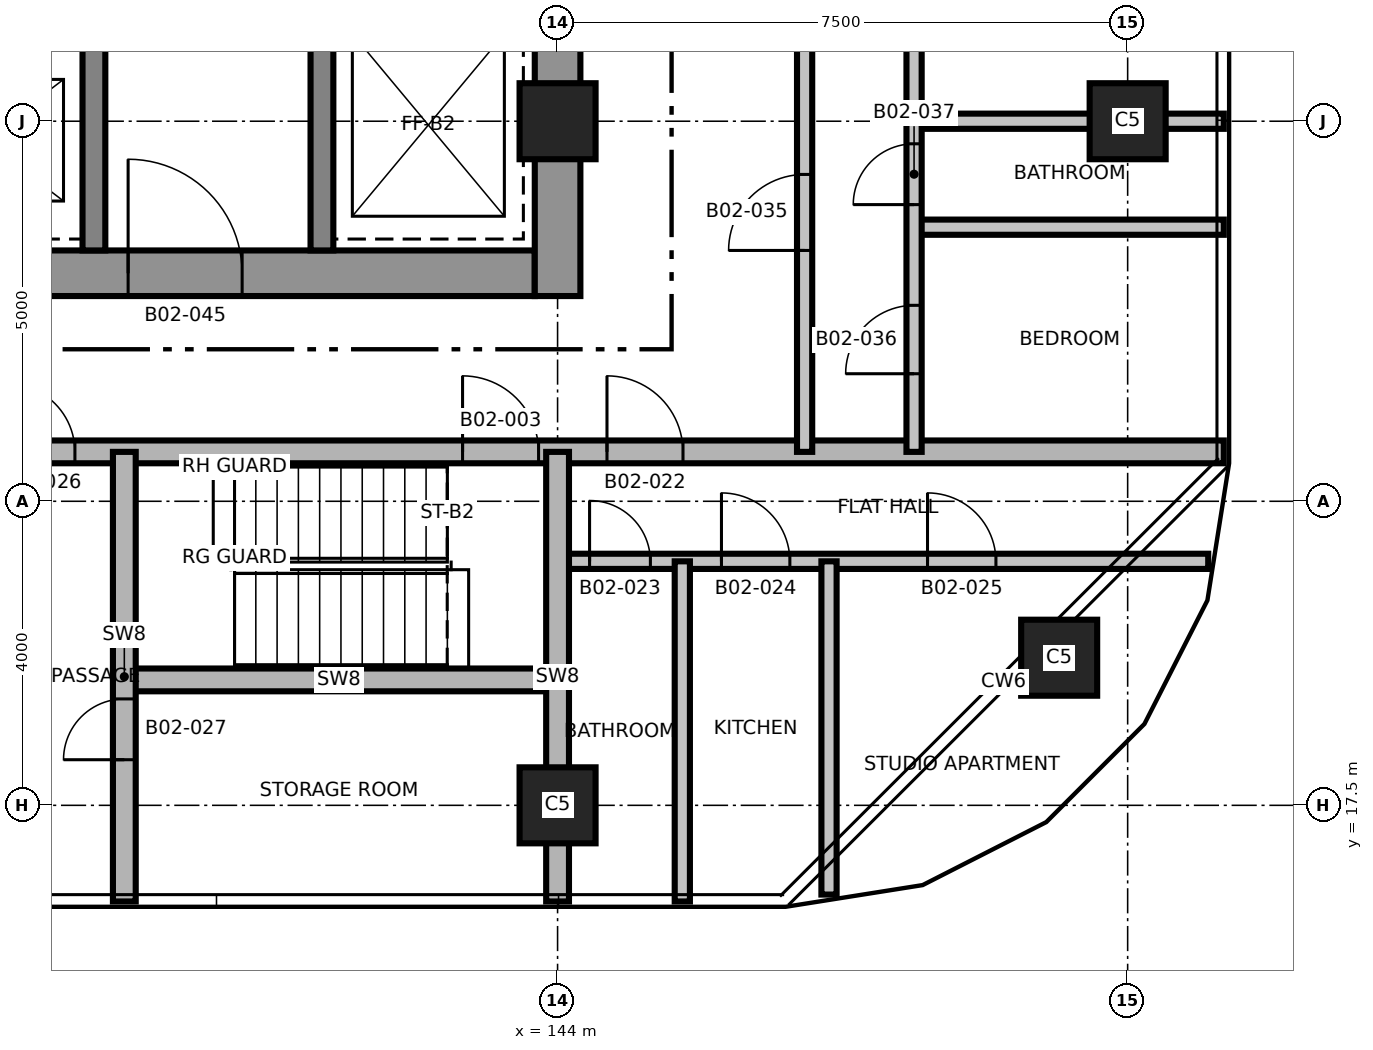
"""IFC4 building model, lengths in metres.
Left out: names, types, materials, properties, quantities, classifications, styles, units other than length and angle.
Written with IfcOpenShell. Run it as: python <this file> out.ifc"""

import sys

from ifc_helpers import new_model, si_unit, direction, frame, frame_2d, origin, origin_2d, place, context, subcontext, project, spatial, rectangle, extrude, element, fill, save


model = new_model("IFC4")
c1 = context("Model", 3, precision=1e-05, world=origin(), true_north=direction((0.0, 1.0)))
c2 = subcontext(c1, "Body", "Model", "MODEL_VIEW")
j1 = project(units=[si_unit("LENGTHUNIT", "METRE"), si_unit("PLANEANGLEUNIT", "RADIAN")], contexts=[c1])
p1 = place(None, origin())
s1 = spatial("IfcSite", under=j1, at=p1, CompositionType="ELEMENT")
p2 = place(p1, origin())
s2 = spatial("IfcBuilding", under=s1, at=p2, CompositionType="ELEMENT")
p3 = place(p2, frame((0.0, 0.0, 48.3)))
s3 = spatial("IfcBuildingStorey", under=s2, at=p3, CompositionType="ELEMENT", Elevation=48.3)
p4 = place(p3, frame((128.7, 24.5, 0.0), z_axis=(0.0, 0.0, 1.0), x_axis=(1.0, 0.0, 0.0)))
e1 = element("IfcWall", 1, at=p4, inside=s3, PredefinedType="SHEAR", context=c2, shape_type="SweptSolid", body=[
    extrude(rectangle(XDim=15.0, YDim=0.6, at=frame_2d((7.5, 0.0))), origin(), (0.0, 0.0, 1.0), 3.7),
])
p5 = place(p4, frame((9.65, 0.0, 0.0)))
e2 = element("IfcOpeningElement", 2, at=p5, cuts=e1, PredefinedType="OPENING", context=c2, shape_type="SweptSolid", body=[
    extrude(rectangle(XDim=1.5, YDim=2.1, at=frame_2d((0.75, 1.05))), frame((0.0, 0.31, 0.0), z_axis=(0.0, -1.0, 0.0), x_axis=(1.0, 0.0, 0.0)), (0.0, 0.0, 1.0), 0.62),
])
p6 = place(p4, frame((1.25, 0.0, 0.0)))
e3 = element("IfcOpeningElement", 3, at=p6, cuts=e1, PredefinedType="OPENING", context=c2, shape_type="SweptSolid", body=[
    extrude(rectangle(XDim=0.9, YDim=2.1, at=frame_2d((0.45, 1.05))), frame((0.0, 0.31, 0.0), z_axis=(0.0, -1.0, 0.0), x_axis=(1.0, 0.0, 0.0)), (0.0, 0.0, 1.0), 0.62),
])
p7 = place(p3, frame((144.0, 24.2, 0.0), z_axis=(0.0, 0.0, 1.0), x_axis=(0.0, 1.0, 0.0)))
e4 = element("IfcWall", 4, at=p7, inside=s3, PredefinedType="SHEAR", context=c2, shape_type="SweptSolid", body=[
    extrude(rectangle(XDim=13.6, YDim=0.6, at=frame_2d((6.8, 0.0))), origin(), (0.0, 0.0, 1.0), 3.7),
])
p8 = place(p3, frame((137.9, 24.8, 0.0), z_axis=(0.0, 0.0, 1.0), x_axis=(0.0, 1.0, 0.0)))
e5 = element("IfcWall", 5, at=p8, inside=s3, PredefinedType="SHEAR", context=c2, shape_type="SweptSolid", body=[
    extrude(rectangle(XDim=12.4, YDim=0.3, at=frame_2d((6.2, 0.0))), origin(), (0.0, 0.0, 1.0), 3.7),
])
p9 = place(p8, frame((3.95, 0.0, 0.0)))
e6 = element("IfcOpeningElement", 6, at=p9, cuts=e5, PredefinedType="OPENING", context=c2, shape_type="SweptSolid", body=[
    extrude(rectangle(XDim=1.5, YDim=2.1, at=frame_2d((0.75, 1.05))), frame((0.0, 0.16, 0.0), z_axis=(0.0, -1.0, 0.0), x_axis=(1.0, 0.0, 0.0)), (0.0, 0.0, 1.0), 0.32),
])
p10 = place(p8, frame((10.45, 0.0, 0.0)))
e7 = element("IfcOpeningElement", 7, at=p10, cuts=e5, PredefinedType="OPENING", context=c2, shape_type="SweptSolid", body=[
    extrude(rectangle(XDim=0.9, YDim=2.1, at=frame_2d((0.45, 1.05))), frame((0.0, 0.16, 0.0), z_axis=(0.0, -1.0, 0.0), x_axis=(1.0, 0.0, 0.0)), (0.0, 0.0, 1.0), 0.32),
])
p11 = place(p3, frame((140.9, 24.8, 0.0), z_axis=(0.0, 0.0, 1.0), x_axis=(0.0, 1.0, 0.0)))
e8 = element("IfcWall", 8, at=p11, inside=s3, PredefinedType="SHEAR", context=c2, shape_type="SweptSolid", body=[
    extrude(rectangle(XDim=12.4, YDim=0.3, at=frame_2d((6.2, 0.0))), origin(), (0.0, 0.0, 1.0), 3.7),
])
p12 = place(p11, frame((5.9, 0.0, 0.0)))
e9 = element("IfcOpeningElement", 9, at=p12, cuts=e8, PredefinedType="OPENING", context=c2, shape_type="SweptSolid", body=[
    extrude(rectangle(XDim=1.2, YDim=2.1, at=frame_2d((0.6, 1.05))), frame((0.0, 0.16, 0.0), z_axis=(0.0, -1.0, 0.0), x_axis=(1.0, 0.0, 0.0)), (0.0, 0.0, 1.0), 0.32),
])
for number, where, z_axis, x_axis in (
    (10, (144.0, 17.5, 0.0), (0.0, 0.0, 1.0), (1.0, 0.0, 0.0)),
    (11, (150.599, 19.442, 0.0), (0.0, 0.0, 1.0), (1.0, 0.0, 0.0)),
    (12, (144.0, 26.5, 0.0), (0.0, 0.0, 1.0), (1.0, 0.0, 0.0)),
    (13, (151.5, 26.5, 0.0), (0.0, 0.0, 1.0), (1.0, 0.0, 0.0)),
):
    element("IfcColumn", number, at=place(p3, frame(where, z_axis=z_axis, x_axis=x_axis)), inside=s3, PredefinedType="COLUMN", context=c2, shape_type="SweptSolid", body=[
        extrude(rectangle(XDim=1.0, YDim=1.0, at=origin_2d()), origin(), (0.0, 0.0, 1.0), 3.7),
    ])
p13 = place(p3, frame((138.25, 19.15, 0.0), z_axis=(0.0, 0.0, 1.0), x_axis=(1.0, 0.0, 0.0)))
e14 = element("IfcWall", 14, at=p13, inside=s3, PredefinedType="SHEAR", context=c2, shape_type="SweptSolid", body=[
    extrude(rectangle(XDim=5.75, YDim=0.3, at=frame_2d((2.875, 0.0))), origin(), (0.0, 0.0, 1.0), 3.4),
])
p14 = place(p3, frame((144.0, 20.71, 0.0), z_axis=(0.0, 0.0, 1.0), x_axis=(1.0, 0.0, 0.0)))
e15 = element("IfcWall", 15, at=p14, inside=s3, PredefinedType="PARTITIONING", context=c2, shape_type="SweptSolid", body=[
    extrude(rectangle(XDim=8.56, YDim=0.2, at=frame_2d((4.28, 0.0))), origin(), (0.0, 0.0, 1.0), 3.4),
])
p15 = place(p14, frame((0.421, 0.0, 0.0)))
e16 = element("IfcOpeningElement", 16, at=p15, cuts=e15, PredefinedType="OPENING", context=c2, shape_type="SweptSolid", body=[
    extrude(rectangle(XDim=0.8, YDim=2.1, at=frame_2d((0.4, 1.05))), frame((0.0, 0.11, 0.0), z_axis=(0.0, -1.0, 0.0), x_axis=(1.0, 0.0, 0.0)), (0.0, 0.0, 1.0), 0.22),
])
p16 = place(p14, frame((2.156, 0.0, 0.0)))
e17 = element("IfcOpeningElement", 17, at=p16, cuts=e15, PredefinedType="OPENING", context=c2, shape_type="SweptSolid", body=[
    extrude(rectangle(XDim=0.9, YDim=2.1, at=frame_2d((0.45, 1.05))), frame((0.0, 0.11, 0.0), z_axis=(0.0, -1.0, 0.0), x_axis=(1.0, 0.0, 0.0)), (0.0, 0.0, 1.0), 0.22),
])
p17 = place(p14, frame((4.867, 0.0, 0.0)))
e18 = element("IfcOpeningElement", 18, at=p17, cuts=e15, PredefinedType="OPENING", context=c2, shape_type="SweptSolid", body=[
    extrude(rectangle(XDim=0.9, YDim=2.1, at=frame_2d((0.45, 1.05))), frame((0.0, 0.11, 0.0), z_axis=(0.0, -1.0, 0.0), x_axis=(1.0, 0.0, 0.0)), (0.0, 0.0, 1.0), 0.22),
])
p18 = place(p3, frame((120.235, 22.15, 0.0), z_axis=(0.0, 0.0, 1.0), x_axis=(1.0, 0.0, 0.0)))
e19 = element("IfcWall", 19, at=p18, inside=s3, PredefinedType="SHEAR", context=c2, shape_type="SweptSolid", body=[
    extrude(rectangle(XDim=32.53, YDim=0.3, at=frame_2d((16.265, 0.0))), origin(), (0.0, 0.0, 1.0), 3.4),
])
p19 = place(p18, frame((22.515, 0.0, 0.0)))
e20 = element("IfcOpeningElement", 20, at=p19, cuts=e19, PredefinedType="OPENING", context=c2, shape_type="SweptSolid", body=[
    extrude(rectangle(XDim=1.0, YDim=2.1, at=frame_2d((0.5, 1.05))), frame((0.0, 0.16, 0.0), z_axis=(0.0, -1.0, 0.0), x_axis=(1.0, 0.0, 0.0)), (0.0, 0.0, 1.0), 0.32),
])
p20 = place(p18, frame((10.865, 0.0, 0.0)))
e21 = element("IfcOpeningElement", 21, at=p20, cuts=e19, PredefinedType="OPENING", context=c2, shape_type="SweptSolid", body=[
    extrude(rectangle(XDim=1.0, YDim=2.1, at=frame_2d((0.5, 1.05))), frame((0.0, 0.16, 0.0), z_axis=(0.0, -1.0, 0.0), x_axis=(1.0, 0.0, 0.0)), (0.0, 0.0, 1.0), 0.32),
])
p21 = place(p18, frame((24.415, 0.0, 0.0)))
e22 = element("IfcOpeningElement", 22, at=p21, cuts=e19, PredefinedType="OPENING", context=c2, shape_type="SweptSolid", body=[
    extrude(rectangle(XDim=1.0, YDim=2.1, at=frame_2d((0.5, 1.05))), frame((0.0, 0.16, 0.0), z_axis=(0.0, -1.0, 0.0), x_axis=(1.0, 0.0, 0.0)), (0.0, 0.0, 1.0), 0.32),
])
p22 = place(p18, frame((16.515, 0.0, 0.0)))
e23 = element("IfcOpeningElement", 23, at=p22, cuts=e19, PredefinedType="OPENING", context=c2, shape_type="SweptSolid", body=[
    extrude(rectangle(XDim=0.9, YDim=2.1, at=frame_2d((0.45, 1.05))), frame((0.0, 0.16, 0.0), z_axis=(0.0, -1.0, 0.0), x_axis=(1.0, 0.0, 0.0)), (0.0, 0.0, 1.0), 0.32),
])
for number, where, z_axis, x_axis in (
    (24, (148.69, 25.106, 0.0), (0.0, 0.0, 1.0), (1.0, 0.0, 0.0)),
    (25, (148.69, 26.5, 0.0), (0.0, 0.0, 1.0), (1.0, 0.0, 0.0)),
):
    element("IfcWall", number, at=place(p3, frame(where, z_axis=z_axis, x_axis=x_axis)), inside=s3, PredefinedType="PARTITIONING", context=c2, shape_type="SweptSolid", body=[
        extrude(rectangle(XDim=4.075, YDim=0.2, at=frame_2d((2.038, 0.0))), origin(), (0.0, 0.0, 1.0), 3.4),
    ])
p23 = place(p3, frame((138.3, 16.235, 0.0), z_axis=(0.0, 0.0, 1.0), x_axis=(0.0, 1.0, 0.0)))
e26 = element("IfcWall", 26, at=p23, inside=s3, PredefinedType="SHEAR", context=c2, shape_type="SweptSolid", body=[
    extrude(rectangle(XDim=5.915, YDim=0.3, at=frame_2d((2.958, 0.0))), origin(), (0.0, 0.0, 1.0), 3.4),
])
p24 = place(p23, frame((1.865, 0.0, 0.0)))
e27 = element("IfcOpeningElement", 27, at=p24, cuts=e26, PredefinedType="OPENING", context=c2, shape_type="SweptSolid", body=[
    extrude(rectangle(XDim=0.8, YDim=2.1, at=frame_2d((0.4, 1.05))), frame((0.0, 0.16, 0.0), z_axis=(0.0, -1.0, 0.0), x_axis=(1.0, 0.0, 0.0)), (0.0, 0.0, 1.0), 0.32),
])
p25 = place(p3, frame((144.0, 16.235, 0.0), z_axis=(0.0, 0.0, 1.0), x_axis=(0.0, 1.0, 0.0)))
e28 = element("IfcWall", 28, at=p25, inside=s3, PredefinedType="SHEAR", context=c2, shape_type="SweptSolid", body=[
    extrude(rectangle(XDim=5.915, YDim=0.3, at=frame_2d((2.958, 0.0))), origin(), (0.0, 0.0, 1.0), 3.4),
])
p26 = place(p3, frame((145.641, 16.235, 0.0), z_axis=(0.0, 0.0, 1.0), x_axis=(0.0, 1.0, 0.0)))
e29 = element("IfcWall", 29, at=p26, inside=s3, PredefinedType="PARTITIONING", context=c2, shape_type="SweptSolid", body=[
    extrude(rectangle(XDim=4.475, YDim=0.2, at=frame_2d((2.237, 0.0))), origin(), (0.0, 0.0, 1.0), 3.4),
])
p27 = place(p3, frame((147.25, 22.15, 0.0), z_axis=(0.0, 0.0, 1.0), x_axis=(0.0, 1.0, 0.0)))
e30 = element("IfcWall", 30, at=p27, inside=s3, PredefinedType="PARTITIONING", context=c2, shape_type="SweptSolid", body=[
    extrude(rectangle(XDim=17.7, YDim=0.2, at=frame_2d((8.85, 0.0))), origin(), (0.0, 0.0, 1.0), 3.4),
])
p28 = place(p27, frame((2.65, 0.0, 0.0)))
e31 = element("IfcOpeningElement", 31, at=p28, cuts=e30, PredefinedType="OPENING", context=c2, shape_type="SweptSolid", body=[
    extrude(rectangle(XDim=1.0, YDim=2.1, at=frame_2d((0.5, 1.05))), frame((0.0, 0.11, 0.0), z_axis=(0.0, -1.0, 0.0), x_axis=(1.0, 0.0, 0.0)), (0.0, 0.0, 1.0), 0.22),
])
p29 = place(p3, frame((147.571, 16.326, 0.0), z_axis=(0.0, 0.0, 1.0), x_axis=(0.0, 1.0, 0.0)))
e32 = element("IfcWall", 32, at=p29, inside=s3, PredefinedType="PARTITIONING", context=c2, shape_type="SweptSolid", body=[
    extrude(rectangle(XDim=4.384, YDim=0.2, at=frame_2d((2.192, 0.0))), origin(), (0.0, 0.0, 1.0), 3.4),
])
p30 = place(p3, frame((148.69, 22.15, 0.0), z_axis=(0.0, 0.0, 1.0), x_axis=(0.0, 1.0, 0.0)))
e33 = element("IfcWall", 33, at=p30, inside=s3, PredefinedType="PARTITIONING", context=c2, shape_type="SweptSolid", body=[
    extrude(rectangle(XDim=17.7, YDim=0.2, at=frame_2d((8.85, 0.0))), origin(), (0.0, 0.0, 1.0), 3.4),
])
p31 = place(p30, frame((1.028, 0.0, 0.0)))
e34 = element("IfcOpeningElement", 34, at=p31, cuts=e33, PredefinedType="OPENING", context=c2, shape_type="SweptSolid", body=[
    extrude(rectangle(XDim=0.9, YDim=2.1, at=frame_2d((0.45, 1.05))), frame((0.0, 0.11, 0.0), z_axis=(0.0, -1.0, 0.0), x_axis=(1.0, 0.0, 0.0)), (0.0, 0.0, 1.0), 0.22),
])
p32 = place(p30, frame((3.253, 0.0, 0.0)))
e35 = element("IfcOpeningElement", 35, at=p32, cuts=e33, PredefinedType="OPENING", context=c2, shape_type="SweptSolid", body=[
    extrude(rectangle(XDim=0.8, YDim=2.1, at=frame_2d((0.4, 1.05))), frame((0.0, 0.11, 0.0), z_axis=(0.0, -1.0, 0.0), x_axis=(1.0, 0.0, 0.0)), (0.0, 0.0, 1.0), 0.22),
])
p33 = place(p30, frame((6.867, 0.0, 0.0)))
e36 = element("IfcOpeningElement", 36, at=p33, cuts=e33, PredefinedType="OPENING", context=c2, shape_type="SweptSolid", body=[
    extrude(rectangle(XDim=0.9, YDim=2.1, at=frame_2d((0.45, 1.05))), frame((0.0, 0.11, 0.0), z_axis=(0.0, -1.0, 0.0), x_axis=(1.0, 0.0, 0.0)), (0.0, 0.0, 1.0), 0.22),
])
p34 = place(p30, frame((11.367, 0.0, 0.0)))
e37 = element("IfcOpeningElement", 37, at=p34, cuts=e33, PredefinedType="OPENING", context=c2, shape_type="SweptSolid", body=[
    extrude(rectangle(XDim=0.9, YDim=2.1, at=frame_2d((0.45, 1.05))), frame((0.0, 0.11, 0.0), z_axis=(0.0, -1.0, 0.0), x_axis=(1.0, 0.0, 0.0)), (0.0, 0.0, 1.0), 0.22),
])
p35 = place(p30, frame((15.075, 0.0, 0.0)))
e38 = element("IfcOpeningElement", 38, at=p35, cuts=e33, PredefinedType="OPENING", context=c2, shape_type="SweptSolid", body=[
    extrude(rectangle(XDim=0.9, YDim=2.1, at=frame_2d((0.45, 1.05))), frame((0.0, 0.11, 0.0), z_axis=(0.0, -1.0, 0.0), x_axis=(1.0, 0.0, 0.0)), (0.0, 0.0, 1.0), 0.22),
])
p36 = place(p19, origin())
e39 = element("IfcDoor", 39, at=p36, inside=s3, OperationType="SINGLE_SWING_LEFT", PredefinedType="DOOR", context=c2, shape_type="SweptSolid", body=[
    extrude(rectangle(XDim=1.0, YDim=2.1, at=frame_2d((0.5, 1.05))), frame((0.0, 0.025, 0.0), z_axis=(0.0, -1.0, 0.0), x_axis=(1.0, 0.0, 0.0)), (0.0, 0.0, 1.0), 0.05),
])
fill(e20, e39)
p37 = place(p21, origin())
e40 = element("IfcDoor", 40, at=p37, inside=s3, OperationType="SINGLE_SWING_RIGHT", PredefinedType="DOOR", context=c2, shape_type="SweptSolid", body=[
    extrude(rectangle(XDim=1.0, YDim=2.1, at=frame_2d((0.5, 1.05))), frame((0.0, 0.025, 0.0), z_axis=(0.0, -1.0, 0.0), x_axis=(1.0, 0.0, 0.0)), (0.0, 0.0, 1.0), 0.05),
])
fill(e22, e40)
p38 = place(p15, origin())
e41 = element("IfcDoor", 41, at=p38, inside=s3, OperationType="SINGLE_SWING_LEFT", PredefinedType="DOOR", context=c2, shape_type="SweptSolid", body=[
    extrude(rectangle(XDim=0.8, YDim=2.1, at=frame_2d((0.4, 1.05))), frame((0.0, 0.025, 0.0), z_axis=(0.0, -1.0, 0.0), x_axis=(1.0, 0.0, 0.0)), (0.0, 0.0, 1.0), 0.05),
])
fill(e16, e41)
p39 = place(p16, origin())
e42 = element("IfcDoor", 42, at=p39, inside=s3, OperationType="SINGLE_SWING_RIGHT", PredefinedType="DOOR", context=c2, shape_type="SweptSolid", body=[
    extrude(rectangle(XDim=0.9, YDim=2.1, at=frame_2d((0.45, 1.05))), frame((0.0, 0.025, 0.0), z_axis=(0.0, -1.0, 0.0), x_axis=(1.0, 0.0, 0.0)), (0.0, 0.0, 1.0), 0.05),
])
fill(e17, e42)
p40 = place(p17, origin())
e43 = element("IfcDoor", 43, at=p40, inside=s3, OperationType="SINGLE_SWING_LEFT", PredefinedType="DOOR", context=c2, shape_type="SweptSolid", body=[
    extrude(rectangle(XDim=0.9, YDim=2.1, at=frame_2d((0.45, 1.05))), frame((0.0, 0.025, 0.0), z_axis=(0.0, -1.0, 0.0), x_axis=(1.0, 0.0, 0.0)), (0.0, 0.0, 1.0), 0.05),
])
fill(e18, e43)
p41 = place(p22, origin())
e44 = element("IfcDoor", 44, at=p41, inside=s3, OperationType="SINGLE_SWING_RIGHT", PredefinedType="DOOR", context=c2, shape_type="SweptSolid", body=[
    extrude(rectangle(XDim=0.9, YDim=2.1, at=frame_2d((0.45, 1.05))), frame((0.0, 0.025, 0.0), z_axis=(0.0, -1.0, 0.0), x_axis=(1.0, 0.0, 0.0)), (0.0, 0.0, 1.0), 0.05),
])
fill(e23, e44)
p42 = place(p24, origin())
e45 = element("IfcDoor", 45, at=p42, inside=s3, OperationType="SINGLE_SWING_LEFT", PredefinedType="DOOR", context=c2, shape_type="SweptSolid", body=[
    extrude(rectangle(XDim=0.8, YDim=2.1, at=frame_2d((0.4, 1.05))), frame((0.0, 0.025, 0.0), z_axis=(0.0, -1.0, 0.0), x_axis=(1.0, 0.0, 0.0)), (0.0, 0.0, 1.0), 0.05),
])
fill(e27, e45)
p43 = place(p28, origin())
e46 = element("IfcDoor", 46, at=p43, inside=s3, OperationType="SINGLE_SWING_LEFT", PredefinedType="DOOR", context=c2, shape_type="SweptSolid", body=[
    extrude(rectangle(XDim=1.0, YDim=2.1, at=frame_2d((0.5, 1.05))), frame((0.0, 0.025, 0.0), z_axis=(0.0, -1.0, 0.0), x_axis=(1.0, 0.0, 0.0)), (0.0, 0.0, 1.0), 0.05),
])
fill(e31, e46)
p44 = place(p31, origin())
e47 = element("IfcDoor", 47, at=p44, inside=s3, OperationType="SINGLE_SWING_RIGHT", PredefinedType="DOOR", context=c2, shape_type="SweptSolid", body=[
    extrude(rectangle(XDim=0.9, YDim=2.1, at=frame_2d((0.45, 1.05))), frame((0.0, 0.025, 0.0), z_axis=(0.0, -1.0, 0.0), x_axis=(1.0, 0.0, 0.0)), (0.0, 0.0, 1.0), 0.05),
])
fill(e34, e47)
p45 = place(p32, origin())
e48 = element("IfcDoor", 48, at=p45, inside=s3, OperationType="SINGLE_SWING_LEFT", PredefinedType="DOOR", context=c2, shape_type="SweptSolid", body=[
    extrude(rectangle(XDim=0.8, YDim=2.1, at=frame_2d((0.4, 1.05))), frame((0.0, 0.025, 0.0), z_axis=(0.0, -1.0, 0.0), x_axis=(1.0, 0.0, 0.0)), (0.0, 0.0, 1.0), 0.05),
])
fill(e35, e48)
p46 = place(p5, origin())
e49 = element("IfcDoor", 49, at=p46, inside=s3, OperationType="SINGLE_SWING_LEFT", PredefinedType="DOOR", context=c2, shape_type="SweptSolid", body=[
    extrude(rectangle(XDim=1.5, YDim=2.1, at=frame_2d((0.75, 1.05))), frame((0.0, 0.025, 0.0), z_axis=(0.0, -1.0, 0.0), x_axis=(1.0, 0.0, 0.0)), (0.0, 0.0, 1.0), 0.05),
])
fill(e2, e49)
save(model, sys.argv[1])
